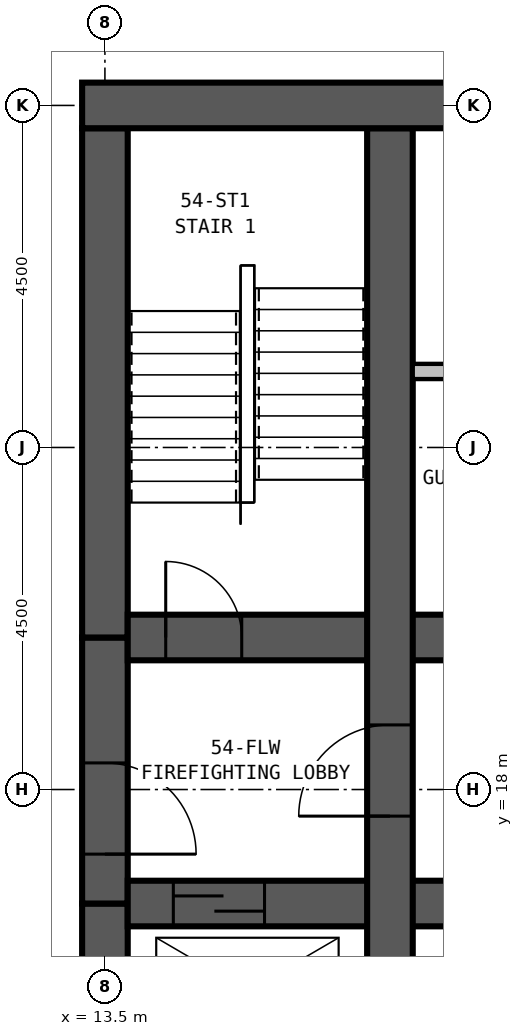
"""IFC4 building model, lengths in metres.
Left out: names, types, materials, properties, quantities, classifications, styles, units other than length and angle.
Written with IfcOpenShell. Run it as: python <this file> out.ifc"""

import sys

from ifc_helpers import new_model, si_unit, direction, frame, frame_2d, origin, place, context, subcontext, project, spatial, rectangle, extrude, element, fill, save


model = new_model("IFC4")
c1 = context("Model", 3, precision=1e-05, world=origin(), true_north=direction((0.0, 1.0)))
c2 = subcontext(c1, "Body", "Model", "MODEL_VIEW")
j1 = project(units=[si_unit("LENGTHUNIT", "METRE"), si_unit("PLANEANGLEUNIT", "RADIAN")], contexts=[c1])
p1 = place(None, origin())
s1 = spatial("IfcSite", under=j1, at=p1, CompositionType="ELEMENT")
p2 = place(p1, origin())
s2 = spatial("IfcBuilding", under=s1, at=p2, CompositionType="ELEMENT")
p3 = place(p2, frame((0.0, 0.0, 207.9)))
s3 = spatial("IfcBuildingStorey", under=s2, at=p3, CompositionType="ELEMENT", Elevation=207.9)
p4 = place(p3, frame((36.3, 27.0, 0.0), z_axis=(0.0, 0.0, 1.0), x_axis=(-1.0, 0.0, 0.0)))
e1 = element("IfcWall", 1, at=p4, inside=s3, PredefinedType="SHEAR", context=c2, shape_type="SweptSolid", body=[
    extrude(rectangle(XDim=23.1, YDim=0.6, at=frame_2d((11.55, 0.0))), origin(), (0.0, 0.0, 1.0), 3.5),
])
p5 = place(p4, frame((17.05, 0.0, 0.0)))
e2 = element("IfcOpeningElement", 2, at=p5, cuts=e1, PredefinedType="OPENING", context=c2, shape_type="SweptSolid", body=[
    extrude(rectangle(XDim=1.0, YDim=2.1, at=frame_2d((0.5, 1.05))), frame((0.0, 0.31, 0.0), z_axis=(0.0, -1.0, 0.0), x_axis=(1.0, 0.0, 0.0)), (0.0, 0.0, 1.0), 0.62),
])
p6 = place(p4, frame((12.05, 0.0, 0.0)))
e3 = element("IfcOpeningElement", 3, at=p6, cuts=e1, PredefinedType="OPENING", context=c2, shape_type="SweptSolid", body=[
    extrude(rectangle(XDim=1.0, YDim=2.1, at=frame_2d((0.5, 1.05))), frame((0.0, 0.31, 0.0), z_axis=(0.0, -1.0, 0.0), x_axis=(1.0, 0.0, 0.0)), (0.0, 0.0, 1.0), 0.62),
])
p7 = place(p4, frame((7.05, 0.0, 0.0)))
e4 = element("IfcOpeningElement", 4, at=p7, cuts=e1, PredefinedType="OPENING", context=c2, shape_type="SweptSolid", body=[
    extrude(rectangle(XDim=1.0, YDim=2.1, at=frame_2d((0.5, 1.05))), frame((0.0, 0.31, 0.0), z_axis=(0.0, -1.0, 0.0), x_axis=(1.0, 0.0, 0.0)), (0.0, 0.0, 1.0), 0.62),
])
p8 = place(p3, frame((17.25, 13.8, 0.0), z_axis=(0.0, 0.0, 1.0), x_axis=(0.0, 1.0, 0.0)))
e5 = element("IfcWall", 5, at=p8, inside=s3, PredefinedType="SHEAR", context=c2, shape_type="SweptSolid", body=[
    extrude(rectangle(XDim=12.9, YDim=0.6, at=frame_2d((6.45, 0.0))), origin(), (0.0, 0.0, 1.0), 3.5),
])
p9 = place(p8, frame((3.85, 0.0, 0.0)))
e6 = element("IfcOpeningElement", 6, at=p9, cuts=e5, PredefinedType="OPENING", context=c2, shape_type="SweptSolid", body=[
    extrude(rectangle(XDim=1.2, YDim=2.1, at=frame_2d((0.6, 1.05))), frame((0.0, 0.31, 0.0), z_axis=(0.0, -1.0, 0.0), x_axis=(1.0, 0.0, 0.0)), (0.0, 0.0, 1.0), 0.62),
])
p10 = place(p3, frame((13.8, 16.5, 0.0), z_axis=(0.0, 0.0, 1.0), x_axis=(1.0, 0.0, 0.0)))
e7 = element("IfcWall", 7, at=p10, inside=s3, PredefinedType="SHEAR", context=c2, shape_type="SweptSolid", body=[
    extrude(rectangle(XDim=21.9, YDim=0.6, at=frame_2d((10.95, 0.0))), origin(), (0.0, 0.0, 1.0), 3.5),
])
p11 = place(p10, frame((5.75, 0.0, 0.0), z_axis=(0.0, 0.0, 1.0), x_axis=(-1.0, 0.0, 0.0)))
e8 = element("IfcOpeningElement", 8, at=p11, cuts=e7, PredefinedType="OPENING", context=c2, shape_type="SweptSolid", body=[
    extrude(rectangle(XDim=1.0, YDim=2.1, at=frame_2d((0.5, 1.05))), frame((0.0, 0.31, 0.0), z_axis=(0.0, -1.0, 0.0), x_axis=(1.0, 0.0, 0.0)), (0.0, 0.0, 1.0), 0.62),
])
p12 = place(p10, frame((10.2, 0.0, 0.0), z_axis=(0.0, 0.0, 1.0), x_axis=(-1.0, 0.0, 0.0)))
e9 = element("IfcOpeningElement", 9, at=p12, cuts=e7, PredefinedType="OPENING", context=c2, shape_type="SweptSolid", body=[
    extrude(rectangle(XDim=1.0, YDim=2.1, at=frame_2d((0.5, 1.05))), frame((0.0, 0.31, 0.0), z_axis=(0.0, -1.0, 0.0), x_axis=(1.0, 0.0, 0.0)), (0.0, 0.0, 1.0), 0.62),
])
p13 = place(p10, frame((12.7, 0.0, 0.0), z_axis=(0.0, 0.0, 1.0), x_axis=(-1.0, 0.0, 0.0)))
e10 = element("IfcOpeningElement", 10, at=p13, cuts=e7, PredefinedType="OPENING", context=c2, shape_type="SweptSolid", body=[
    extrude(rectangle(XDim=1.0, YDim=2.1, at=frame_2d((0.5, 1.05))), frame((0.0, 0.31, 0.0), z_axis=(0.0, -1.0, 0.0), x_axis=(1.0, 0.0, 0.0)), (0.0, 0.0, 1.0), 0.62),
])
p14 = place(p10, frame((17.15, 0.0, 0.0), z_axis=(0.0, 0.0, 1.0), x_axis=(-1.0, 0.0, 0.0)))
e11 = element("IfcOpeningElement", 11, at=p14, cuts=e7, PredefinedType="OPENING", context=c2, shape_type="SweptSolid", body=[
    extrude(rectangle(XDim=1.0, YDim=2.1, at=frame_2d((0.5, 1.05))), frame((0.0, 0.31, 0.0), z_axis=(0.0, -1.0, 0.0), x_axis=(1.0, 0.0, 0.0)), (0.0, 0.0, 1.0), 0.62),
])
p15 = place(p10, frame((0.6, 0.0, 0.0)))
e12 = element("IfcOpeningElement", 12, at=p15, cuts=e7, PredefinedType="OPENING", context=c2, shape_type="SweptSolid", body=[
    extrude(rectangle(XDim=1.2, YDim=2.1, at=frame_2d((0.6, 1.05))), frame((0.0, 0.31, 0.0), z_axis=(0.0, -1.0, 0.0), x_axis=(1.0, 0.0, 0.0)), (0.0, 0.0, 1.0), 0.62),
])
p16 = place(p10, frame((19.6, 0.0, 0.0)))
e13 = element("IfcOpeningElement", 13, at=p16, cuts=e7, PredefinedType="OPENING", context=c2, shape_type="SweptSolid", body=[
    extrude(rectangle(XDim=1.2, YDim=2.1, at=frame_2d((0.6, 1.05))), frame((0.0, 0.31, 0.0), z_axis=(0.0, -1.0, 0.0), x_axis=(1.0, 0.0, 0.0)), (0.0, 0.0, 1.0), 0.62),
])
p17 = place(p3, frame((13.8, 20.0, 0.0), z_axis=(0.0, 0.0, 1.0), x_axis=(1.0, 0.0, 0.0)))
e14 = element("IfcWall", 14, at=p17, inside=s3, PredefinedType="SHEAR", context=c2, shape_type="SweptSolid", body=[
    extrude(rectangle(XDim=21.9, YDim=0.6, at=frame_2d((10.95, 0.0))), origin(), (0.0, 0.0, 1.0), 3.5),
])
p18 = place(p17, frame((0.5, 0.0, 0.0)))
e15 = element("IfcOpeningElement", 15, at=p18, cuts=e14, PredefinedType="OPENING", context=c2, shape_type="SweptSolid", body=[
    extrude(rectangle(XDim=1.0, YDim=2.1, at=frame_2d((0.5, 1.05))), frame((0.0, 0.31, 0.0), z_axis=(0.0, -1.0, 0.0), x_axis=(1.0, 0.0, 0.0)), (0.0, 0.0, 1.0), 0.62),
])
p19 = place(p17, frame((20.5, 0.0, 0.0)))
e16 = element("IfcOpeningElement", 16, at=p19, cuts=e14, PredefinedType="OPENING", context=c2, shape_type="SweptSolid", body=[
    extrude(rectangle(XDim=1.0, YDim=2.1, at=frame_2d((0.5, 1.05))), frame((0.0, 0.31, 0.0), z_axis=(0.0, -1.0, 0.0), x_axis=(1.0, 0.0, 0.0)), (0.0, 0.0, 1.0), 0.62),
])
p20 = place(p17, frame((9.15, 0.0, 0.0)))
e17 = element("IfcOpeningElement", 17, at=p20, cuts=e14, PredefinedType="OPENING", context=c2, shape_type="SweptSolid", body=[
    extrude(rectangle(XDim=1.1, YDim=2.1, at=frame_2d((0.55, 1.05))), frame((0.0, 0.31, 0.0), z_axis=(0.0, -1.0, 0.0), x_axis=(1.0, 0.0, 0.0)), (0.0, 0.0, 1.0), 0.62),
])
p21 = place(p17, frame((11.65, 0.0, 0.0)))
e18 = element("IfcOpeningElement", 18, at=p21, cuts=e14, PredefinedType="OPENING", context=c2, shape_type="SweptSolid", body=[
    extrude(rectangle(XDim=1.1, YDim=2.1, at=frame_2d((0.55, 1.05))), frame((0.0, 0.31, 0.0), z_axis=(0.0, -1.0, 0.0), x_axis=(1.0, 0.0, 0.0)), (0.0, 0.0, 1.0), 0.62),
])
p22 = place(p17, frame((14.15, 0.0, 0.0)))
e19 = element("IfcOpeningElement", 19, at=p22, cuts=e14, PredefinedType="OPENING", context=c2, shape_type="SweptSolid", body=[
    extrude(rectangle(XDim=1.1, YDim=2.1, at=frame_2d((0.55, 1.05))), frame((0.0, 0.31, 0.0), z_axis=(0.0, -1.0, 0.0), x_axis=(1.0, 0.0, 0.0)), (0.0, 0.0, 1.0), 0.62),
])
p23 = place(p17, frame((16.65, 0.0, 0.0)))
e20 = element("IfcOpeningElement", 20, at=p23, cuts=e14, PredefinedType="OPENING", context=c2, shape_type="SweptSolid", body=[
    extrude(rectangle(XDim=1.1, YDim=2.1, at=frame_2d((0.55, 1.05))), frame((0.0, 0.31, 0.0), z_axis=(0.0, -1.0, 0.0), x_axis=(1.0, 0.0, 0.0)), (0.0, 0.0, 1.0), 0.62),
])
p24 = place(p17, frame((4.75, 0.0, 0.0)))
e21 = element("IfcOpeningElement", 21, at=p24, cuts=e14, PredefinedType="OPENING", context=c2, shape_type="SweptSolid", body=[
    extrude(rectangle(XDim=1.0, YDim=2.1, at=frame_2d((0.5, 1.05))), frame((0.0, 0.31, 0.0), z_axis=(0.0, -1.0, 0.0), x_axis=(1.0, 0.0, 0.0)), (0.0, 0.0, 1.0), 0.62),
])
p25 = place(p17, frame((6.7, 0.0, 0.0)))
e22 = element("IfcOpeningElement", 22, at=p25, cuts=e14, PredefinedType="OPENING", context=c2, shape_type="SweptSolid", body=[
    extrude(rectangle(XDim=1.0, YDim=2.1, at=frame_2d((0.5, 1.05))), frame((0.0, 0.31, 0.0), z_axis=(0.0, -1.0, 0.0), x_axis=(1.0, 0.0, 0.0)), (0.0, 0.0, 1.0), 0.62),
])
p26 = place(p3, frame((13.5, 26.7, 0.0), z_axis=(0.0, 0.0, 1.0), x_axis=(0.0, -1.0, 0.0)))
e23 = element("IfcWall", 23, at=p26, inside=s3, PredefinedType="SHEAR", context=c2, shape_type="SweptSolid", body=[
    extrude(rectangle(XDim=6.7, YDim=0.6, at=frame_2d((3.35, 0.0))), origin(), (0.0, 0.0, 1.0), 3.5),
])
p27 = place(p3, frame((13.5, 20.0, 0.0), z_axis=(0.0, 0.0, 1.0), x_axis=(0.0, -1.0, 0.0)))
e24 = element("IfcWall", 24, at=p27, inside=s3, PredefinedType="SHEAR", context=c2, shape_type="SweptSolid", body=[
    extrude(rectangle(XDim=3.5, YDim=0.6, at=frame_2d((1.75, 0.0))), origin(), (0.0, 0.0, 1.0), 3.5),
])
p28 = place(p27, frame((1.65, 0.0, 0.0)))
e25 = element("IfcOpeningElement", 25, at=p28, cuts=e24, PredefinedType="OPENING", context=c2, shape_type="SweptSolid", body=[
    extrude(rectangle(XDim=1.2, YDim=2.1, at=frame_2d((0.6, 1.05))), frame((0.0, 0.31, 0.0), z_axis=(0.0, -1.0, 0.0), x_axis=(1.0, 0.0, 0.0)), (0.0, 0.0, 1.0), 0.62),
])
p29 = place(p3, frame((13.5, 16.5, 0.0), z_axis=(0.0, 0.0, 1.0), x_axis=(0.0, -1.0, 0.0)))
e26 = element("IfcWall", 26, at=p29, inside=s3, PredefinedType="SHEAR", context=c2, shape_type="SweptSolid", body=[
    extrude(rectangle(XDim=2.7, YDim=0.6, at=frame_2d((1.35, 0.0))), origin(), (0.0, 0.0, 1.0), 3.5),
])
p30 = place(p3, frame((17.55, 23.5, 0.0), z_axis=(0.0, 0.0, 1.0), x_axis=(1.0, 0.0, 0.0)))
e27 = element("IfcWall", 27, at=p30, inside=s3, PredefinedType="PARTITIONING", context=c2, shape_type="SweptSolid", body=[
    extrude(rectangle(XDim=14.4, YDim=0.2, at=frame_2d((7.2, 0.0))), origin(), (0.0, 0.0, 1.0), 3.25),
])
p31 = place(p28, origin())
e28 = element("IfcDoor", 28, at=p31, inside=s3, OperationType="SINGLE_SWING_RIGHT", PredefinedType="DOOR", context=c2, shape_type="SweptSolid", body=[
    extrude(rectangle(XDim=1.2, YDim=2.1, at=frame_2d((0.6, 1.05))), frame((0.0, 0.3, 0.0), z_axis=(0.0, -1.0, 0.0), x_axis=(1.0, 0.0, 0.0)), (0.0, 0.0, 1.0), 0.6),
])
fill(e25, e28)
p32 = place(p9, origin())
e29 = element("IfcDoor", 29, at=p32, inside=s3, OperationType="SINGLE_SWING_LEFT", PredefinedType="DOOR", context=c2, shape_type="SweptSolid", body=[
    extrude(rectangle(XDim=1.2, YDim=2.1, at=frame_2d((0.6, 1.05))), frame((0.0, 0.3, 0.0), z_axis=(0.0, -1.0, 0.0), x_axis=(1.0, 0.0, 0.0)), (0.0, 0.0, 1.0), 0.6),
])
fill(e6, e29)
p33 = place(p18, origin())
e30 = element("IfcDoor", 30, at=p33, inside=s3, OperationType="SINGLE_SWING_LEFT", PredefinedType="DOOR", context=c2, shape_type="SweptSolid", body=[
    extrude(rectangle(XDim=1.0, YDim=2.1, at=frame_2d((0.5, 1.05))), frame((0.0, 0.3, 0.0), z_axis=(0.0, -1.0, 0.0), x_axis=(1.0, 0.0, 0.0)), (0.0, 0.0, 1.0), 0.6),
])
fill(e15, e30)
p34 = place(p15, origin())
e31 = element("IfcDoor", 31, at=p34, inside=s3, OperationType="SLIDING_TO_LEFT", PredefinedType="DOOR", context=c2, shape_type="SweptSolid", body=[
    extrude(rectangle(XDim=1.2, YDim=2.1, at=frame_2d((0.6, 1.05))), frame((0.0, 0.3, 0.0), z_axis=(0.0, -1.0, 0.0), x_axis=(1.0, 0.0, 0.0)), (0.0, 0.0, 1.0), 0.6),
])
fill(e12, e31)
save(model, sys.argv[1])
